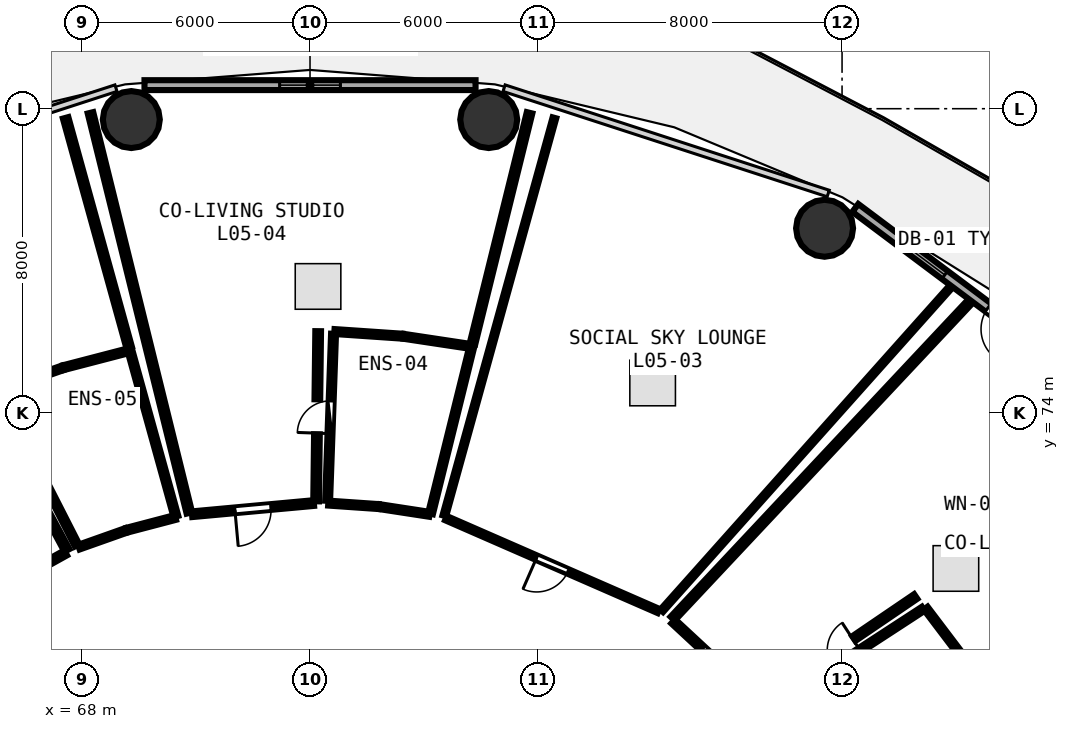
"""IFC4 building model, lengths in metres.
Left out: names, types, materials, properties, quantities, classifications, styles, units other than length and angle.
Written with IfcOpenShell. Run it as: python <this file> out.ifc"""

import sys

from ifc_helpers import new_model, si_unit, direction, frame, frame_2d, origin, origin_2d, place, context, subcontext, project, spatial, rectangle, circle, extrude, element, fill, save


model = new_model("IFC4")
c1 = context("Model", 3, precision=1e-05, world=origin(), true_north=direction((0.0, 1.0)))
c2 = subcontext(c1, "Body", "Model", "MODEL_VIEW")
j1 = project(units=[si_unit("LENGTHUNIT", "METRE"), si_unit("PLANEANGLEUNIT", "RADIAN")], contexts=[c1])
p1 = place(None, origin())
s1 = spatial("IfcSite", under=j1, at=p1, CompositionType="ELEMENT")
p2 = place(p1, origin())
s2 = spatial("IfcBuilding", under=s1, at=p2, CompositionType="ELEMENT")
p3 = place(p2, frame((0.0, 0.0, 22.5)))
s3 = spatial("IfcBuildingStorey", under=s2, at=p3, CompositionType="ELEMENT", Elevation=22.5)
for number, where, z_axis, x_axis in (
    (1, (87.54, 78.854, 0.0), (0.0, 0.0, 1.0), (1.0, 0.0, 0.0)),
    (2, (78.702, 81.714, 0.0), (0.0, 0.0, 1.0), (1.0, 0.0, 0.0)),
    (3, (69.298, 81.714, 0.0), (0.0, 0.0, 1.0), (1.0, 0.0, 0.0)),
):
    element("IfcColumn", number, at=place(p3, frame(where, z_axis=z_axis, x_axis=x_axis)), inside=s3, PredefinedType="COLUMN", context=c2, shape_type="SweptSolid", body=[
        extrude(circle(Radius=0.75, at=origin_2d()), origin(), (0.0, 0.0, 1.0), 3.75),
    ])
p4 = place(p3, frame((94.984, 74.418, 0.0), z_axis=(0.0, 0.0, 1.0), x_axis=(-0.80030733173, 0.599590005569, 0.0)))
e4 = element("IfcWall", 4, at=p4, inside=s3, PredefinedType="SOLIDWALL", context=c2, shape_type="SweptSolid", body=[
    extrude(rectangle(XDim=8.291, YDim=0.26, at=frame_2d((4.145, 0.0))), origin(), (0.0, 0.0, 1.0), 3.475),
])
p5 = place(p4, frame((2.97, 0.0, 0.0)))
e5 = element("IfcOpeningElement", 5, at=p5, cuts=e4, PredefinedType="OPENING", context=c2, shape_type="SweptSolid", body=[
    extrude(rectangle(XDim=0.95, YDim=2.1, at=frame_2d((0.475, 1.05))), frame((0.0, 0.14, 0.0), z_axis=(0.0, -1.0, 0.0), x_axis=(1.0, 0.0, 0.0)), (0.0, 0.0, 1.0), 0.28),
])
p6 = place(p4, frame((5.35, 0.0, 0.85)))
e6 = element("IfcOpeningElement", 6, at=p6, cuts=e4, PredefinedType="OPENING", context=c2, shape_type="SweptSolid", body=[
    extrude(rectangle(XDim=1.2, YDim=1.45, at=frame_2d((0.6, 0.725))), frame((0.0, 0.14, 0.0), z_axis=(0.0, -1.0, 0.0), x_axis=(1.0, 0.0, 0.0)), (0.0, 0.0, 1.0), 0.28),
])
p7 = place(p3, frame((78.356, 82.62, 0.0), z_axis=(0.0, 0.0, 1.0), x_axis=(-1.0, 0.0, 0.0)))
e7 = element("IfcWall", 7, at=p7, inside=s3, PredefinedType="SOLIDWALL", context=c2, shape_type="SweptSolid", body=[
    extrude(rectangle(XDim=8.712, YDim=0.26, at=frame_2d((4.356, 0.0))), origin(), (0.0, 0.0, 1.0), 3.475),
])
p8 = place(p7, frame((3.556, 0.0, 0.85)))
e8 = element("IfcOpeningElement", 8, at=p8, cuts=e7, PredefinedType="OPENING", context=c2, shape_type="SweptSolid", body=[
    extrude(rectangle(XDim=1.6, YDim=1.45, at=frame_2d((0.8, 0.725))), frame((0.0, 0.14, 0.0), z_axis=(0.0, -1.0, 0.0), x_axis=(1.0, 0.0, 0.0)), (0.0, 0.0, 1.0), 0.28),
])
p9 = place(p3, frame((86.083, 66.2, 0.0), z_axis=(0.0, 0.0, 1.0), x_axis=(0.837796261941, 0.545982988267, 0.0)))
e9 = element("IfcWall", 9, at=p9, inside=s3, PredefinedType="PLUMBINGWALL", context=c2, shape_type="SweptSolid", body=[
    extrude(rectangle(XDim=4.838, YDim=0.13, at=frame_2d((2.419, 0.0))), origin(), (0.0, 0.0, 1.0), 3.235),
])
p10 = place(p9, frame((1.989, 0.0, 0.0)))
e10 = element("IfcOpeningElement", 10, at=p10, cuts=e9, PredefinedType="OPENING", context=c2, shape_type="SweptSolid", body=[
    extrude(rectangle(XDim=0.86, YDim=2.05, at=frame_2d((0.43, 1.025))), frame((0.0, 0.075, 0.0), z_axis=(0.0, -1.0, 0.0), x_axis=(1.0, 0.0, 0.0)), (0.0, 0.0, 1.0), 0.15),
])
p11 = place(p3, frame((85.806, 66.425, 0.0), z_axis=(0.0, 0.0, 1.0), x_axis=(-0.7329267348, 0.680307578538, 0.0)))
e11 = element("IfcWall", 11, at=p11, inside=s3, PredefinedType="PARTITIONING", context=c2, shape_type="SweptSolid", body=[
    extrude(rectangle(XDim=3.067, YDim=0.15, at=frame_2d((1.533, 0.0))), origin(), (0.0, 0.0, 1.0), 2.875),
])
p12 = place(p11, frame((1.059, 0.0, 0.0)))
e12 = element("IfcOpeningElement", 12, at=p12, cuts=e11, PredefinedType="OPENING", context=c2, shape_type="SweptSolid", body=[
    extrude(rectangle(XDim=0.95, YDim=2.08, at=frame_2d((0.475, 1.04))), frame((0.0, 0.085, 0.0), z_axis=(0.0, -1.0, 0.0), x_axis=(1.0, 0.0, 0.0)), (0.0, 0.0, 1.0), 0.17),
])
p13 = place(p3, frame((83.172, 68.783, 0.0), z_axis=(0.0, 0.0, 1.0), x_axis=(-0.916419655578, 0.400218708797, 0.0)))
e13 = element("IfcWall", 13, at=p13, inside=s3, PredefinedType="PARTITIONING", context=c2, shape_type="SweptSolid", body=[
    extrude(rectangle(XDim=6.104, YDim=0.12, at=frame_2d((3.052, 0.0))), origin(), (0.0, 0.0, 1.0), 2.875),
])
p14 = place(p13, frame((2.602, 0.0, 0.0)))
e14 = element("IfcOpeningElement", 14, at=p14, cuts=e13, PredefinedType="OPENING", context=c2, shape_type="SweptSolid", body=[
    extrude(rectangle(XDim=0.9, YDim=2.08, at=frame_2d((0.45, 1.04))), frame((0.0, 0.07, 0.0), z_axis=(0.0, -1.0, 0.0), x_axis=(1.0, 0.0, 0.0)), (0.0, 0.0, 1.0), 0.14),
])
p15 = place(p3, frame((74.463, 71.684, 0.0), z_axis=(0.0, 0.0, 1.0), x_axis=(0.035428098094, 0.999372227884, 0.0)))
e15 = element("IfcWall", 15, at=p15, inside=s3, PredefinedType="PLUMBINGWALL", context=c2, shape_type="SweptSolid", body=[
    extrude(rectangle(XDim=4.396, YDim=0.13, at=frame_2d((2.198, 0.0))), origin(), (0.0, 0.0, 1.0), 3.175),
])
p16 = place(p15, frame((1.768, 0.0, 0.0)))
e16 = element("IfcOpeningElement", 16, at=p16, cuts=e15, PredefinedType="OPENING", context=c2, shape_type="SweptSolid", body=[
    extrude(rectangle(XDim=0.86, YDim=2.05, at=frame_2d((0.43, 1.025))), frame((0.0, 0.075, 0.0), z_axis=(0.0, -1.0, 0.0), x_axis=(1.0, 0.0, 0.0)), (0.0, 0.0, 1.0), 0.15),
])
p17 = place(p3, frame((74.1, 71.624, 0.0), z_axis=(0.0, 0.0, 1.0), x_axis=(-0.995822031417, -0.091315287572, 0.0)))
e17 = element("IfcWall", 17, at=p17, inside=s3, PredefinedType="PARTITIONING", context=c2, shape_type="SweptSolid", body=[
    extrude(rectangle(XDim=3.219, YDim=0.15, at=frame_2d((1.609, 0.0))), origin(), (0.0, 0.0, 1.0), 3.235),
])
p18 = place(p17, frame((1.135, 0.0, 0.0)))
e18 = element("IfcOpeningElement", 18, at=p18, cuts=e17, PredefinedType="OPENING", context=c2, shape_type="SweptSolid", body=[
    extrude(rectangle(XDim=0.95, YDim=2.08, at=frame_2d((0.475, 1.04))), frame((0.0, 0.085, 0.0), z_axis=(0.0, -1.0, 0.0), x_axis=(1.0, 0.0, 0.0)), (0.0, 0.0, 1.0), 0.17),
])
p19 = place(p3, frame((67.87, 70.51, 0.0), z_axis=(0.0, 0.0, 1.0), x_axis=(-0.45442479933, 0.890785104138, 0.0)))
e19 = element("IfcWall", 19, at=p19, inside=s3, PredefinedType="PLUMBINGWALL", context=c2, shape_type="SweptSolid", body=[
    extrude(rectangle(XDim=4.514, YDim=0.13, at=frame_2d((2.257, 0.0))), origin(), (0.0, 0.0, 1.0), 3.175),
])
p20 = place(p19, frame((1.827, 0.0, 0.0)))
e20 = element("IfcOpeningElement", 20, at=p20, cuts=e19, PredefinedType="OPENING", context=c2, shape_type="SweptSolid", body=[
    extrude(rectangle(XDim=0.86, YDim=2.05, at=frame_2d((0.43, 1.025))), frame((0.0, 0.075, 0.0), z_axis=(0.0, -1.0, 0.0), x_axis=(1.0, 0.0, 0.0)), (0.0, 0.0, 1.0), 0.15),
])
p21 = place(p3, frame((67.571, 70.313, 0.0), z_axis=(0.0, 0.0, 1.0), x_axis=(-0.874179278891, -0.48560332408, 0.0)))
e21 = element("IfcWall", 21, at=p21, inside=s3, PredefinedType="PARTITIONING", context=c2, shape_type="SweptSolid", body=[
    extrude(rectangle(XDim=3.14, YDim=0.15, at=frame_2d((1.57, 0.0))), origin(), (0.0, 0.0, 1.0), 3.48),
])
p22 = place(p21, frame((1.095, 0.0, 0.0)))
e22 = element("IfcOpeningElement", 22, at=p22, cuts=e21, PredefinedType="OPENING", context=c2, shape_type="SweptSolid", body=[
    extrude(rectangle(XDim=0.95, YDim=2.08, at=frame_2d((0.475, 1.04))), frame((0.0, 0.085, 0.0), z_axis=(0.0, -1.0, 0.0), x_axis=(1.0, 0.0, 0.0)), (0.0, 0.0, 1.0), 0.17),
])
p23 = place(p3, frame((87.657, 63.778, 0.0), z_axis=(0.0, 0.0, 1.0), x_axis=(0.926333713065, 0.376703931542, 0.0)))
e23 = element("IfcWall", 23, at=p23, inside=s3, PredefinedType="PARTITIONING", context=c2, shape_type="SweptSolid", body=[
    extrude(rectangle(XDim=12.099, YDim=0.15, at=frame_2d((6.05, 0.0))), origin(), (0.0, 0.0, 1.0), 2.875),
])
p24 = place(p3, frame((90.199, 68.858, 0.0), z_axis=(0.0, 0.0, 1.0), x_axis=(0.60376191721, -0.797164692725, 0.0)))
e24 = element("IfcWall", 24, at=p24, inside=s3, PredefinedType="PLUMBINGWALL", context=c2, shape_type="SweptSolid", body=[
    extrude(rectangle(XDim=1.669, YDim=0.13, at=frame_2d((0.834, 0.0))), origin(), (0.0, 0.0, 1.0), 3.175),
])
p25 = place(p3, frame((83.542, 68.581, 0.0), z_axis=(0.0, 0.0, 1.0), x_axis=(0.684261294523, 0.729236916796, 0.0)))
e25 = element("IfcWall", 25, at=p25, inside=s3, PredefinedType="PARTITIONING", context=c2, shape_type="SweptSolid", body=[
    extrude(rectangle(XDim=11.438, YDim=0.15, at=frame_2d((5.719, 0.0))), origin(), (0.0, 0.0, 1.0), 2.875),
])
p26 = place(p3, frame((89.939, 69.166, 0.0), z_axis=(0.0, 0.0, 1.0), x_axis=(-0.826811291248, -0.562479411769, 0.0)))
e26 = element("IfcWall", 26, at=p26, inside=s3, PredefinedType="PARTITIONING", context=c2, shape_type="SweptSolid", body=[
    extrude(rectangle(XDim=1.971, YDim=0.15, at=frame_2d((0.985, 0.0))), origin(), (0.0, 0.0, 1.0), 3.48),
])
p27 = place(p3, frame((77.534, 71.289, 0.0), z_axis=(0.0, 0.0, 1.0), x_axis=(0.26671307518, 0.963775977875, 0.0)))
e27 = element("IfcWall", 27, at=p27, inside=s3, PredefinedType="PARTITIONING", context=c2, shape_type="SweptSolid", body=[
    extrude(rectangle(XDim=10.865, YDim=0.1, at=frame_2d((5.432, 0.0))), origin(), (0.0, 0.0, 1.0), 2.875),
])
p28 = place(p3, frame((90.844, 77.294, 0.0), z_axis=(0.0, 0.0, 1.0), x_axis=(-0.66580890104, -0.746122313897, 0.0)))
e28 = element("IfcWall", 28, at=p28, inside=s3, PredefinedType="PARTITIONING", context=c2, shape_type="SweptSolid", body=[
    extrude(rectangle(XDim=11.399, YDim=0.1, at=frame_2d((5.7, 0.0))), origin(), (0.0, 0.0, 1.0), 2.875),
])
p29 = place(p3, frame((77.145, 71.327, 0.0), z_axis=(0.0, 0.0, 1.0), x_axis=(-0.988427236939, 0.151695739152, 0.0)))
e29 = element("IfcWall", 29, at=p29, inside=s3, PredefinedType="PLUMBINGWALL", context=c2, shape_type="SweptSolid", body=[
    extrude(rectangle(XDim=1.32, YDim=0.13, at=frame_2d((0.66, 0.0))), origin(), (0.0, 0.0, 1.0), 3.235),
])
p30 = place(p3, frame((75.801, 71.531, 0.0), z_axis=(0.0, 0.0, 1.0), x_axis=(-0.997629018134, 0.068821088175, 0.0)))
e30 = element("IfcWall", 30, at=p30, inside=s3, PredefinedType="PLUMBINGWALL", context=c2, shape_type="SweptSolid", body=[
    extrude(rectangle(XDim=1.323, YDim=0.13, at=frame_2d((0.662, 0.0))), origin(), (0.0, 0.0, 1.0), 3.48),
])
p31 = place(p3, frame((74.641, 76.137, 0.0), z_axis=(0.0, 0.0, 1.0), x_axis=(0.997667905772, -0.06825503493, 0.0)))
e31 = element("IfcWall", 31, at=p31, inside=s3, PredefinedType="PLUMBINGWALL", context=c2, shape_type="SweptSolid", body=[
    extrude(rectangle(XDim=1.792, YDim=0.13, at=frame_2d((0.896, 0.0))), origin(), (0.0, 0.0, 1.0), 3.48),
])
p32 = place(p3, frame((76.469, 76.01, 0.0), z_axis=(0.0, 0.0, 1.0), x_axis=(0.988799846431, -0.14924765894, 0.0)))
e32 = element("IfcWall", 32, at=p32, inside=s3, PredefinedType="PLUMBINGWALL", context=c2, shape_type="SweptSolid", body=[
    extrude(rectangle(XDim=1.79, YDim=0.13, at=frame_2d((0.895, 0.0))), origin(), (0.0, 0.0, 1.0), 3.48),
])
p33 = place(p3, frame((78.253, 75.721, 0.0), z_axis=(0.0, 0.0, 1.0), x_axis=(-0.240229117536, -0.970716215528, 0.0)))
e33 = element("IfcWall", 33, at=p33, inside=s3, PredefinedType="PLUMBINGWALL", context=c2, shape_type="SweptSolid", body=[
    extrude(rectangle(XDim=4.509, YDim=0.13, at=frame_2d((2.255, 0.0))), origin(), (0.0, 0.0, 1.0), 3.175),
])
p34 = place(p3, frame((70.825, 71.363, 0.0), z_axis=(0.0, 0.0, 1.0), x_axis=(-0.239971369295, 0.970779965759, 0.0)))
e34 = element("IfcWall", 34, at=p34, inside=s3, PredefinedType="PARTITIONING", context=c2, shape_type="SweptSolid", body=[
    extrude(rectangle(XDim=10.846, YDim=0.15, at=frame_2d((5.423, 0.0))), origin(), (0.0, 0.0, 1.0), 2.875),
])
p35 = place(p3, frame((79.777, 81.892, 0.0), z_axis=(0.0, 0.0, 1.0), x_axis=(-0.240000910349, -0.970772662899, 0.0)))
e35 = element("IfcWall", 35, at=p35, inside=s3, PredefinedType="PARTITIONING", context=c2, shape_type="SweptSolid", body=[
    extrude(rectangle(XDim=6.257, YDim=0.15, at=frame_2d((3.128, 0.0))), origin(), (0.0, 0.0, 1.0), 2.875),
])
p36 = place(p3, frame((74.215, 76.146, 0.0), z_axis=(0.0, 0.0, 1.0), x_axis=(-0.012119496596, -0.999926556204, 0.0)))
e36 = element("IfcWall", 36, at=p36, inside=s3, PredefinedType="PARTITIONING", context=c2, shape_type="SweptSolid", body=[
    extrude(rectangle(XDim=1.793, YDim=0.15, at=frame_2d((0.896, 0.0))), origin(), (0.0, 0.0, 1.0), 3.175),
])
p37 = place(p3, frame((74.182, 73.433, 0.0), z_axis=(0.0, 0.0, 1.0), x_axis=(-0.01217734225, -0.999925853419, 0.0)))
e37 = element("IfcWall", 37, at=p37, inside=s3, PredefinedType="PARTITIONING", context=c2, shape_type="SweptSolid", body=[
    extrude(rectangle(XDim=1.764, YDim=0.15, at=frame_2d((0.882, 0.0))), origin(), (0.0, 0.0, 1.0), 3.48),
])
p38 = place(p3, frame((70.458, 71.245, 0.0), z_axis=(0.0, 0.0, 1.0), x_axis=(-0.967235526128, -0.253880753498, 0.0)))
e38 = element("IfcWall", 38, at=p38, inside=s3, PredefinedType="PLUMBINGWALL", context=c2, shape_type="SweptSolid", body=[
    extrude(rectangle(XDim=1.314, YDim=0.13, at=frame_2d((0.657, 0.0))), origin(), (0.0, 0.0, 1.0), 3.235),
])
p39 = place(p3, frame((69.148, 70.899, 0.0), z_axis=(0.0, 0.0, 1.0), x_axis=(-0.942537812533, -0.33409949408, 0.0)))
e39 = element("IfcWall", 39, at=p39, inside=s3, PredefinedType="PLUMBINGWALL", context=c2, shape_type="SweptSolid", body=[
    extrude(rectangle(XDim=1.307, YDim=0.13, at=frame_2d((0.654, 0.0))), origin(), (0.0, 0.0, 1.0), 3.48),
])
p40 = place(p3, frame((65.81, 74.591, 0.0), z_axis=(0.0, 0.0, 1.0), x_axis=(0.943615101484, 0.331044619728, 0.0)))
e40 = element("IfcWall", 40, at=p40, inside=s3, PredefinedType="PLUMBINGWALL", context=c2, shape_type="SweptSolid", body=[
    extrude(rectangle(XDim=1.77, YDim=0.13, at=frame_2d((0.885, 0.0))), origin(), (0.0, 0.0, 1.0), 3.48),
])
p41 = place(p3, frame((67.518, 75.188, 0.0), z_axis=(0.0, 0.0, 1.0), x_axis=(0.967790422801, 0.251757219427, 0.0)))
e41 = element("IfcWall", 41, at=p41, inside=s3, PredefinedType="PLUMBINGWALL", context=c2, shape_type="SweptSolid", body=[
    extrude(rectangle(XDim=1.78, YDim=0.13, at=frame_2d((0.89, 0.0))), origin(), (0.0, 0.0, 1.0), 3.48),
])
p42 = place(p3, frame((69.265, 75.622, 0.0), z_axis=(0.0, 0.0, 1.0), x_axis=(0.267094578575, -0.963670320232, 0.0)))
e42 = element("IfcWall", 42, at=p42, inside=s3, PredefinedType="PLUMBINGWALL", context=c2, shape_type="SweptSolid", body=[
    extrude(rectangle(XDim=4.516, YDim=0.13, at=frame_2d((2.258, 0.0))), origin(), (0.0, 0.0, 1.0), 2.875),
])
p43 = place(p3, frame((67.569, 81.76, 0.0), z_axis=(0.0, 0.0, 1.0), x_axis=(0.266691519666, -0.963781942837, 0.0)))
e43 = element("IfcWall", 43, at=p43, inside=s3, PredefinedType="PARTITIONING", context=c2, shape_type="SweptSolid", body=[
    extrude(rectangle(XDim=6.268, YDim=0.15, at=frame_2d((3.134, 0.0))), origin(), (0.0, 0.0, 1.0), 2.875),
])
p44 = place(p3, frame((66.754, 71.958, 0.0), z_axis=(0.0, 0.0, 1.0), x_axis=(0.473466863657, -0.880811630838, 0.0)))
e44 = element("IfcWall", 44, at=p44, inside=s3, PredefinedType="PARTITIONING", context=c2, shape_type="SweptSolid", body=[
    extrude(rectangle(XDim=1.794, YDim=0.15, at=frame_2d((0.897, 0.0))), origin(), (0.0, 0.0, 1.0), 3.235),
])
p45 = place(p5, frame((0.95, 0.0, 0.0), z_axis=(0.0, 0.0, 1.0), x_axis=(-1.0, 0.0, 0.0)))
e45 = element("IfcDoor", 45, at=p45, inside=s3, OperationType="SINGLE_SWING_RIGHT", PredefinedType="DOOR", context=c2, shape_type="SweptSolid", body=[
    extrude(rectangle(XDim=0.95, YDim=2.1, at=frame_2d((0.475, 1.05))), frame((0.0, 0.025, 0.0), z_axis=(0.0, -1.0, 0.0), x_axis=(1.0, 0.0, 0.0)), (0.0, 0.0, 1.0), 0.05),
])
fill(e5, e45)
p46 = place(p6, origin())
e46 = element("IfcWindow", 46, at=p46, inside=s3, PartitioningType="SINGLE_PANEL", PredefinedType="WINDOW", context=c2, shape_type="SweptSolid", body=[
    extrude(rectangle(XDim=1.2, YDim=1.45, at=frame_2d((0.6, 0.725))), frame((0.0, 0.03, 0.0), z_axis=(0.0, -1.0, 0.0), x_axis=(1.0, 0.0, 0.0)), (0.0, 0.0, 1.0), 0.06),
])
fill(e6, e46)
p47 = place(p8, origin())
e47 = element("IfcWindow", 47, at=p47, inside=s3, PartitioningType="SINGLE_PANEL", PredefinedType="WINDOW", context=c2, shape_type="SweptSolid", body=[
    extrude(rectangle(XDim=1.6, YDim=1.45, at=frame_2d((0.8, 0.725))), frame((0.0, 0.03, 0.0), z_axis=(0.0, -1.0, 0.0), x_axis=(1.0, 0.0, 0.0)), (0.0, 0.0, 1.0), 0.06),
])
fill(e8, e47)
p48 = place(p10, origin())
e48 = element("IfcDoor", 48, at=p48, inside=s3, OperationType="SINGLE_SWING_RIGHT", PredefinedType="DOOR", context=c2, shape_type="SweptSolid", body=[
    extrude(rectangle(XDim=0.86, YDim=2.05, at=frame_2d((0.43, 1.025))), frame((0.0, 0.025, 0.0), z_axis=(0.0, -1.0, 0.0), x_axis=(1.0, 0.0, 0.0)), (0.0, 0.0, 1.0), 0.05),
])
fill(e10, e48)
p49 = place(p12, origin())
e49 = element("IfcDoor", 49, at=p49, inside=s3, OperationType="SINGLE_SWING_LEFT", PredefinedType="DOOR", context=c2, shape_type="SweptSolid", body=[
    extrude(rectangle(XDim=0.95, YDim=2.08, at=frame_2d((0.475, 1.04))), frame((0.0, 0.025, 0.0), z_axis=(0.0, -1.0, 0.0), x_axis=(1.0, 0.0, 0.0)), (0.0, 0.0, 1.0), 0.05),
])
fill(e12, e49)
p50 = place(p14, origin())
e50 = element("IfcDoor", 50, at=p50, inside=s3, OperationType="SINGLE_SWING_RIGHT", PredefinedType="DOOR", context=c2, shape_type="SweptSolid", body=[
    extrude(rectangle(XDim=0.9, YDim=2.08, at=frame_2d((0.45, 1.04))), frame((0.0, 0.025, 0.0), z_axis=(0.0, -1.0, 0.0), x_axis=(1.0, 0.0, 0.0)), (0.0, 0.0, 1.0), 0.05),
])
fill(e14, e50)
p51 = place(p16, origin())
e51 = element("IfcDoor", 51, at=p51, inside=s3, OperationType="SINGLE_SWING_LEFT", PredefinedType="DOOR", context=c2, shape_type="SweptSolid", body=[
    extrude(rectangle(XDim=0.86, YDim=2.05, at=frame_2d((0.43, 1.025))), frame((0.0, 0.025, 0.0), z_axis=(0.0, -1.0, 0.0), x_axis=(1.0, 0.0, 0.0)), (0.0, 0.0, 1.0), 0.05),
])
fill(e16, e51)
p52 = place(p18, origin())
e52 = element("IfcDoor", 52, at=p52, inside=s3, OperationType="SINGLE_SWING_RIGHT", PredefinedType="DOOR", context=c2, shape_type="SweptSolid", body=[
    extrude(rectangle(XDim=0.95, YDim=2.08, at=frame_2d((0.475, 1.04))), frame((0.0, 0.025, 0.0), z_axis=(0.0, -1.0, 0.0), x_axis=(1.0, 0.0, 0.0)), (0.0, 0.0, 1.0), 0.05),
])
fill(e18, e52)
save(model, sys.argv[1])
